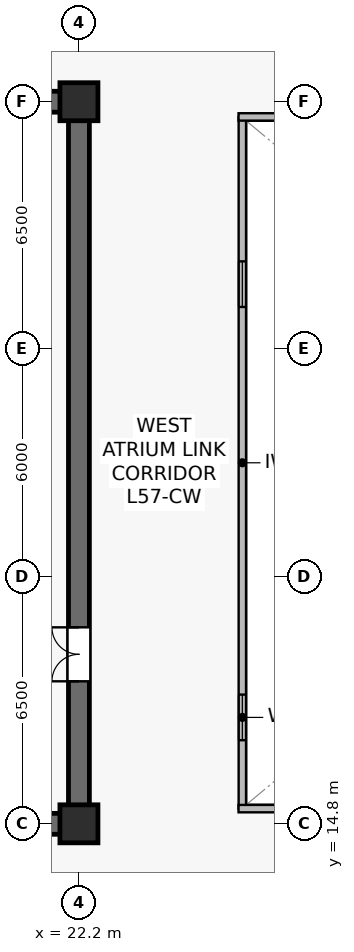
"""IFC4 building model, lengths in metres.
Left out: names, types, materials, properties, quantities, classifications, styles, units other than length and angle.
Written with IfcOpenShell. Run it as: python <this file> out.ifc"""

import sys

from ifc_helpers import new_model, si_unit, direction, frame, frame_2d, origin, origin_2d, place, context, subcontext, project, spatial, rectangle, extrude, source, transform, mapped, element, fill, save


model = new_model("IFC4")
c1 = context("Model", 3, precision=1e-05, world=origin(), true_north=direction((0.0, 1.0)))
c2 = subcontext(c1, "Body", "Model", "MODEL_VIEW")
j1 = project(units=[si_unit("LENGTHUNIT", "METRE"), si_unit("PLANEANGLEUNIT", "RADIAN")], contexts=[c1])
p1 = place(None, origin())
s1 = spatial("IfcSite", under=j1, at=p1, CompositionType="ELEMENT")
p2 = place(p1, origin())
s2 = spatial("IfcBuilding", under=s1, at=p2, CompositionType="ELEMENT")
p3 = place(p2, frame((0.0, 0.0, 238.3)))
s3 = spatial("IfcBuildingStorey", under=s2, at=p3, CompositionType="ELEMENT", Elevation=238.3)
p4 = place(p3, frame((7.125, 14.8, 0.0), z_axis=(0.0, 0.0, 1.0), x_axis=(1.0, 0.0, 0.0)))
e1 = element("IfcWall", 1, at=p4, inside=s3, PredefinedType="SHEAR", context=c2, shape_type="SweptSolid", body=[
    extrude(rectangle(XDim=15.35, YDim=0.55, at=frame_2d((7.675, 0.0))), origin(), (0.0, 0.0, 1.0), 3.8),
])
p5 = place(p3, frame((7.125, 33.8, 0.0), z_axis=(0.0, 0.0, 1.0), x_axis=(1.0, 0.0, 0.0)))
e2 = element("IfcWall", 2, at=p5, inside=s3, PredefinedType="SHEAR", context=c2, shape_type="SweptSolid", body=[
    extrude(rectangle(XDim=15.35, YDim=0.55, at=frame_2d((7.675, 0.0))), origin(), (0.0, 0.0, 1.0), 3.8),
])
p6 = place(p5, frame((5.625, 0.0, 0.0)))
e3 = element("IfcOpeningElement", 3, at=p6, cuts=e2, PredefinedType="OPENING", context=c2, shape_type="SweptSolid", body=[
    extrude(rectangle(XDim=0.95, YDim=2.15, at=frame_2d((0.475, 1.075))), frame((0.0, 0.285, 0.0), z_axis=(0.0, -1.0, 0.0), x_axis=(1.0, 0.0, 0.0)), (0.0, 0.0, 1.0), 0.57),
])
p7 = place(p5, frame((8.99, 0.0, 0.0)))
e4 = element("IfcOpeningElement", 4, at=p7, cuts=e2, PredefinedType="OPENING", context=c2, shape_type="SweptSolid", body=[
    extrude(rectangle(XDim=0.95, YDim=2.15, at=frame_2d((0.475, 1.075))), frame((0.0, 0.285, 0.0), z_axis=(0.0, -1.0, 0.0), x_axis=(1.0, 0.0, 0.0)), (0.0, 0.0, 1.0), 0.57),
])
p8 = place(p5, frame((12.39, 0.0, 0.0)))
e5 = element("IfcOpeningElement", 5, at=p8, cuts=e2, PredefinedType="OPENING", context=c2, shape_type="SweptSolid", body=[
    extrude(rectangle(XDim=0.95, YDim=2.15, at=frame_2d((0.475, 1.075))), frame((0.0, 0.285, 0.0), z_axis=(0.0, -1.0, 0.0), x_axis=(1.0, 0.0, 0.0)), (0.0, 0.0, 1.0), 0.57),
])
p9 = place(p3, frame((22.2, 15.075, 0.0), z_axis=(0.0, 0.0, 1.0), x_axis=(0.0, 1.0, 0.0)))
e6 = element("IfcWall", 6, at=p9, inside=s3, PredefinedType="SHEAR", context=c2, shape_type="SweptSolid", body=[
    extrude(rectangle(XDim=18.45, YDim=0.55, at=frame_2d((9.225, 0.0))), origin(), (0.0, 0.0, 1.0), 3.8),
])
p10 = place(p9, frame((3.475, 0.0, 0.0)))
e7 = element("IfcOpeningElement", 7, at=p10, cuts=e6, PredefinedType="OPENING", context=c2, shape_type="SweptSolid", body=[
    extrude(rectangle(XDim=1.42, YDim=2.2, at=frame_2d((0.71, 1.1))), frame((0.0, 0.285, 0.0), z_axis=(0.0, -1.0, 0.0), x_axis=(1.0, 0.0, 0.0)), (0.0, 0.0, 1.0), 0.57),
])
m1 = source(origin(), c2, "Body", "SweptSolid", [
    extrude(rectangle(XDim=1.0, YDim=1.0, at=origin_2d()), origin(), (0.0, 0.0, 1.0), 4.1),
])
for number, where, z_axis, x_axis in (
    (8, (22.2, 14.8, 0.0), (0.0, 0.0, 1.0), (1.0, 0.0, 0.0)),
    (9, (22.2, 33.8, 0.0), (0.0, 0.0, 1.0), (1.0, 0.0, 0.0)),
):
    element("IfcColumn", number, at=place(p3, frame(where, z_axis=z_axis, x_axis=x_axis)), inside=s3, PredefinedType="COLUMN", context=c2, shape_type="MappedRepresentation", body=[
        mapped(m1, transform((0.0, 0.0, 0.0), scale=1.0)),
    ])
p11 = place(p3, frame((26.5, 15.2, 0.0), z_axis=(0.0, 0.0, 1.0), x_axis=(0.0, 1.0, 0.0)))
e10 = element("IfcWall", 10, at=p11, inside=s3, PredefinedType="SOLIDWALL", context=c2, shape_type="SweptSolid", body=[
    extrude(rectangle(XDim=18.2, YDim=0.195, at=frame_2d((9.1, 0.0))), origin(), (0.0, 0.0, 1.0), 3.8),
])
p12 = place(p11, frame((1.8, 0.0, 0.9)))
e11 = element("IfcOpeningElement", 11, at=p12, cuts=e10, PredefinedType="OPENING", context=c2, shape_type="SweptSolid", body=[
    extrude(rectangle(XDim=1.2, YDim=1.35, at=frame_2d((0.6, 0.675))), frame((0.0, 0.107, 0.0), z_axis=(0.0, -1.0, 0.0), x_axis=(1.0, 0.0, 0.0)), (0.0, 0.0, 1.0), 0.215),
])
p13 = place(p11, frame((13.2, 0.0, 0.9)))
e12 = element("IfcOpeningElement", 12, at=p13, cuts=e10, PredefinedType="OPENING", context=c2, shape_type="SweptSolid", body=[
    extrude(rectangle(XDim=1.2, YDim=1.35, at=frame_2d((0.6, 0.675))), frame((0.0, 0.107, 0.0), z_axis=(0.0, -1.0, 0.0), x_axis=(1.0, 0.0, 0.0)), (0.0, 0.0, 1.0), 0.215),
])
for number, where, z_axis, x_axis in (
    (13, (26.4, 15.2, 0.0), (0.0, 0.0, 1.0), (1.0, 0.0, 0.0)),
    (14, (26.4, 33.4, 0.0), (0.0, 0.0, 1.0), (1.0, 0.0, 0.0)),
):
    element("IfcWall", number, at=place(p3, frame(where, z_axis=z_axis, x_axis=x_axis)), inside=s3, PredefinedType="SOLIDWALL", context=c2, shape_type="SweptSolid", body=[
        extrude(rectangle(XDim=22.0, YDim=0.195, at=frame_2d((11.0, 0.0))), origin(), (0.0, 0.0, 1.0), 3.8),
    ])
m2 = source(origin(), c2, "Body", "SweptSolid", [
    extrude(rectangle(XDim=1.2, YDim=1.35, at=frame_2d((0.6, 0.675))), frame((0.0, 0.03, 0.0), z_axis=(0.0, -1.0, 0.0), x_axis=(1.0, 0.0, 0.0)), (0.0, 0.0, 1.0), 0.06),
])
p14 = place(p12, origin())
e15 = element("IfcWindow", 15, at=p14, inside=s3, PartitioningType="SINGLE_PANEL", PredefinedType="WINDOW", context=c2, shape_type="MappedRepresentation", body=[
    mapped(m2, transform((0.0, 0.0, 0.0), scale=1.0)),
])
fill(e11, e15)
p15 = place(p13, origin())
e16 = element("IfcWindow", 16, at=p15, inside=s3, PartitioningType="SINGLE_PANEL", PredefinedType="WINDOW", context=c2, shape_type="MappedRepresentation", body=[
    mapped(m2, transform((0.0, 0.0, 0.0), scale=1.0)),
])
fill(e12, e16)
m3 = source(origin(), c2, "Body", "SweptSolid", [
    extrude(rectangle(XDim=1.42, YDim=2.2, at=frame_2d((0.71, 1.1))), frame((0.0, 0.025, 0.0), z_axis=(0.0, -1.0, 0.0), x_axis=(1.0, 0.0, 0.0)), (0.0, 0.0, 1.0), 0.05),
])
p16 = place(p10, origin())
e17 = element("IfcDoor", 17, at=p16, inside=s3, OperationType="DOUBLE_DOOR_SINGLE_SWING", PredefinedType="DOOR", context=c2, shape_type="MappedRepresentation", body=[
    mapped(m3, transform((0.0, 0.0, 0.0), scale=1.0)),
])
fill(e7, e17)
save(model, sys.argv[1])
